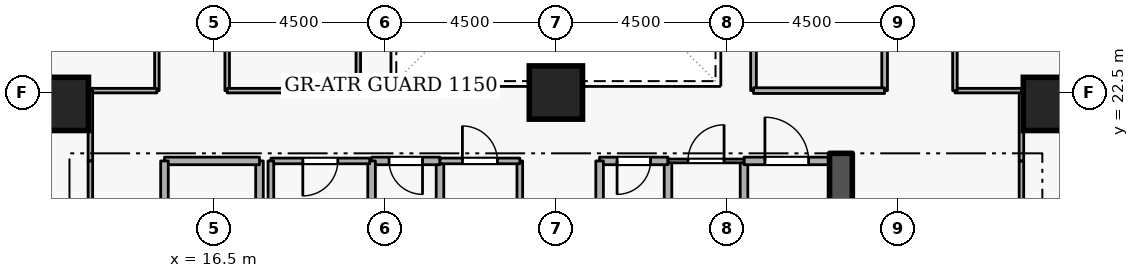
"""IFC4 building model, lengths in metres.
Left out: names, types, materials, properties, quantities, classifications, styles, units other than length and angle.
Written with IfcOpenShell. Run it as: python <this file> out.ifc"""

import sys

from ifc_helpers import new_model, si_unit, direction, frame, frame_2d, origin, origin_2d, place, context, subcontext, project, spatial, rectangle, extrude, element, fill, save


model = new_model("IFC4")
c1 = context("Model", 3, precision=1e-05, world=origin(), true_north=direction((0.0, 1.0)))
c2 = subcontext(c1, "Body", "Model", "MODEL_VIEW")
j1 = project(units=[si_unit("LENGTHUNIT", "METRE"), si_unit("PLANEANGLEUNIT", "RADIAN")], contexts=[c1])
p1 = place(None, origin())
s1 = spatial("IfcSite", under=j1, at=p1, CompositionType="ELEMENT")
p2 = place(p1, origin())
s2 = spatial("IfcBuilding", under=s1, at=p2, CompositionType="ELEMENT")
p3 = place(p2, frame((0.0, 0.0, 60.9)))
s3 = spatial("IfcBuildingStorey", under=s2, at=p3, CompositionType="ELEMENT", Elevation=60.9)
p4 = place(p3, frame((33.0, 15.2, 0.0), z_axis=(0.0, 0.0, 1.0), x_axis=(0.0, 1.0, 0.0)))
e1 = element("IfcWall", 1, at=p4, inside=s3, PredefinedType="SHEAR", context=c2, shape_type="SweptSolid", body=[
    extrude(rectangle(XDim=5.7, YDim=0.6, at=frame_2d((2.85, 0.0))), origin(), (0.0, 0.0, 1.0), 3.6),
])
for number, where, z_axis, x_axis in (
    (2, (12.5, 22.2, 0.0), (0.0, 0.0, 1.0), (1.0, 0.0, 0.0)),
    (3, (38.5, 22.2, 0.0), (0.0, 0.0, 1.0), (1.0, 0.0, 0.0)),
    (4, (25.5, 22.5, 0.0), (0.0, 0.0, 1.0), (1.0, 0.0, 0.0)),
):
    element("IfcColumn", number, at=place(p3, frame(where, z_axis=z_axis, x_axis=x_axis)), inside=s3, PredefinedType="COLUMN", context=c2, shape_type="SweptSolid", body=[
        extrude(rectangle(XDim=1.4, YDim=1.4, at=origin_2d()), origin(), (0.0, 0.0, 1.0), 3.6),
    ])
p5 = place(p3, frame((17.7, 18.4, 0.0), z_axis=(0.0, 0.0, 1.0), x_axis=(0.0, 1.0, 0.0)))
e5 = element("IfcWall", 5, at=p5, inside=s3, PredefinedType="STANDARD", context=c2, shape_type="SweptSolid", body=[
    extrude(rectangle(XDim=2.3, YDim=0.2, at=frame_2d((1.15, 0.0))), origin(), (0.0, 0.0, 1.0), 2.545),
])
p6 = place(p3, frame((17.7, 20.7, 0.0), z_axis=(0.0, 0.0, 1.0), x_axis=(-1.0, 0.0, 0.0)))
e6 = element("IfcWall", 6, at=p6, inside=s3, PredefinedType="STANDARD", context=c2, shape_type="SweptSolid", body=[
    extrude(rectangle(XDim=2.5, YDim=0.2, at=frame_2d((1.25, 0.0))), origin(), (0.0, 0.0, 1.0), 3.34),
])
p7 = place(p3, frame((15.2, 20.7, 0.0), z_axis=(0.0, 0.0, 1.0), x_axis=(0.0, -1.0, 0.0)))
e7 = element("IfcWall", 7, at=p7, inside=s3, PredefinedType="STANDARD", context=c2, shape_type="SweptSolid", body=[
    extrude(rectangle(XDim=5.7, YDim=0.2, at=frame_2d((2.85, 0.0))), origin(), (0.0, 0.0, 1.0), 3.34),
])
p8 = place(p7, frame((2.275, 0.0, 0.0)))
e8 = element("IfcOpeningElement", 8, at=p8, cuts=e7, PredefinedType="OPENING", context=c2, shape_type="SweptSolid", body=[
    extrude(rectangle(XDim=1.15, YDim=2.1, at=frame_2d((0.575, 1.05))), frame((0.0, 0.11, 0.0), z_axis=(0.0, -1.0, 0.0), x_axis=(1.0, 0.0, 0.0)), (0.0, 0.0, 1.0), 0.22),
])
p9 = place(p3, frame((28.45, 18.65, 0.0), z_axis=(0.0, 0.0, 1.0), x_axis=(0.0, 1.0, 0.0)))
e9 = element("IfcWall", 9, at=p9, inside=s3, PredefinedType="STANDARD", context=c2, shape_type="SweptSolid", body=[
    extrude(rectangle(XDim=2.05, YDim=0.2, at=frame_2d((1.025, 0.0))), origin(), (0.0, 0.0, 1.0), 3.34),
])
p10 = place(p3, frame((28.45, 20.7, 0.0), z_axis=(0.0, 0.0, 1.0), x_axis=(-1.0, 0.0, 0.0)))
e10 = element("IfcWall", 10, at=p10, inside=s3, PredefinedType="STANDARD", context=c2, shape_type="SweptSolid", body=[
    extrude(rectangle(XDim=1.8, YDim=0.2, at=frame_2d((0.9, 0.0))), origin(), (0.0, 0.0, 1.0), 3.34),
])
p11 = place(p10, frame((0.46, 0.0, 0.0)))
e11 = element("IfcOpeningElement", 11, at=p11, cuts=e10, PredefinedType="OPENING", context=c2, shape_type="SweptSolid", body=[
    extrude(rectangle(XDim=0.88, YDim=2.04, at=frame_2d((0.44, 1.02))), frame((0.0, 0.11, 0.0), z_axis=(0.0, -1.0, 0.0), x_axis=(1.0, 0.0, 0.0)), (0.0, 0.0, 1.0), 0.22),
])
for number, where, z_axis, x_axis in (
    (12, (26.65, 20.7, 0.0), (0.0, 0.0, 1.0), (0.0, -1.0, 0.0)),
    (13, (22.45, 18.65, 0.0), (0.0, 0.0, 1.0), (0.0, 1.0, 0.0)),
):
    element("IfcWall", number, at=place(p3, frame(where, z_axis=z_axis, x_axis=x_axis)), inside=s3, PredefinedType="STANDARD", context=c2, shape_type="SweptSolid", body=[
        extrude(rectangle(XDim=2.05, YDim=0.2, at=frame_2d((1.025, 0.0))), origin(), (0.0, 0.0, 1.0), 3.34),
    ])
p12 = place(p3, frame((22.45, 20.7, 0.0), z_axis=(0.0, 0.0, 1.0), x_axis=(-1.0, 0.0, 0.0)))
e14 = element("IfcWall", 14, at=p12, inside=s3, PredefinedType="STANDARD", context=c2, shape_type="SweptSolid", body=[
    extrude(rectangle(XDim=1.8, YDim=0.2, at=frame_2d((0.9, 0.0))), origin(), (0.0, 0.0, 1.0), 3.34),
])
p13 = place(p12, frame((0.46, 0.0, 0.0)))
e15 = element("IfcOpeningElement", 15, at=p13, cuts=e14, PredefinedType="OPENING", context=c2, shape_type="SweptSolid", body=[
    extrude(rectangle(XDim=0.88, YDim=2.04, at=frame_2d((0.44, 1.02))), frame((0.0, 0.11, 0.0), z_axis=(0.0, -1.0, 0.0), x_axis=(1.0, 0.0, 0.0)), (0.0, 0.0, 1.0), 0.22),
])
for number, where, z_axis, x_axis in (
    (16, (20.65, 20.7, 0.0), (0.0, 0.0, 1.0), (0.0, -1.0, 0.0)),
    (17, (30.45, 18.65, 0.0), (0.0, 0.0, 1.0), (0.0, 1.0, 0.0)),
):
    element("IfcWall", number, at=place(p3, frame(where, z_axis=z_axis, x_axis=x_axis)), inside=s3, PredefinedType="STANDARD", context=c2, shape_type="SweptSolid", body=[
        extrude(rectangle(XDim=2.05, YDim=0.2, at=frame_2d((1.025, 0.0))), origin(), (0.0, 0.0, 1.0), 3.34),
    ])
p14 = place(p3, frame((30.45, 20.7, 0.0), z_axis=(0.0, 0.0, 1.0), x_axis=(1.0, 0.0, 0.0)))
e18 = element("IfcWall", 18, at=p14, inside=s3, PredefinedType="STANDARD", context=c2, shape_type="SweptSolid", body=[
    extrude(rectangle(XDim=2.25, YDim=0.2, at=frame_2d((1.125, 0.0))), origin(), (0.0, 0.0, 1.0), 3.34),
])
p15 = place(p14, frame((0.55, 0.0, 0.0)))
e19 = element("IfcOpeningElement", 19, at=p15, cuts=e18, PredefinedType="OPENING", context=c2, shape_type="SweptSolid", body=[
    extrude(rectangle(XDim=1.15, YDim=2.1, at=frame_2d((0.575, 1.05))), frame((0.0, 0.11, 0.0), z_axis=(0.0, -1.0, 0.0), x_axis=(1.0, 0.0, 0.0)), (0.0, 0.0, 1.0), 0.22),
])
p16 = place(p3, frame((20.6, 20.7, 0.0), z_axis=(0.0, 0.0, 1.0), x_axis=(-1.0, 0.0, 0.0)))
e20 = element("IfcWall", 20, at=p16, inside=s3, PredefinedType="PARTITIONING", context=c2, shape_type="SweptSolid", body=[
    extrude(rectangle(XDim=2.6, YDim=0.15, at=frame_2d((1.3, 0.0))), origin(), (0.0, 0.0, 1.0), 3.34),
])
p17 = place(p16, frame((0.84, 0.0, 0.0)))
e21 = element("IfcOpeningElement", 21, at=p17, cuts=e20, PredefinedType="OPENING", context=c2, shape_type="SweptSolid", body=[
    extrude(rectangle(XDim=0.92, YDim=2.08, at=frame_2d((0.46, 1.04))), frame((0.0, 0.085, 0.0), z_axis=(0.0, -1.0, 0.0), x_axis=(1.0, 0.0, 0.0)), (0.0, 0.0, 1.0), 0.17),
])
p18 = place(p3, frame((18.0, 20.7, 0.0), z_axis=(0.0, 0.0, 1.0), x_axis=(0.0, -1.0, 0.0)))
e22 = element("IfcWall", 22, at=p18, inside=s3, PredefinedType="PARTITIONING", context=c2, shape_type="SweptSolid", body=[
    extrude(rectangle(XDim=2.05, YDim=0.15, at=frame_2d((1.025, 0.0))), origin(), (0.0, 0.0, 1.0), 2.545),
])
p19 = place(p3, frame((24.55, 20.7, 0.0), z_axis=(0.0, 0.0, 1.0), x_axis=(0.0, -1.0, 0.0)))
e23 = element("IfcWall", 23, at=p19, inside=s3, PredefinedType="PARTITIONING", context=c2, shape_type="SweptSolid", body=[
    extrude(rectangle(XDim=2.05, YDim=0.15, at=frame_2d((1.025, 0.0))), origin(), (0.0, 0.0, 1.0), 3.34),
])
p20 = place(p3, frame((22.45, 20.7, 0.0), z_axis=(0.0, 0.0, 1.0), x_axis=(1.0, 0.0, 0.0)))
e24 = element("IfcWall", 24, at=p20, inside=s3, PredefinedType="PARTITIONING", context=c2, shape_type="SweptSolid", body=[
    extrude(rectangle(XDim=2.1, YDim=0.15, at=frame_2d((1.05, 0.0))), origin(), (0.0, 0.0, 1.0), 3.34),
])
p21 = place(p20, frame((0.59, 0.0, 0.0)))
e25 = element("IfcOpeningElement", 25, at=p21, cuts=e24, PredefinedType="OPENING", context=c2, shape_type="SweptSolid", body=[
    extrude(rectangle(XDim=0.92, YDim=2.08, at=frame_2d((0.46, 1.04))), frame((0.0, 0.085, 0.0), z_axis=(0.0, -1.0, 0.0), x_axis=(1.0, 0.0, 0.0)), (0.0, 0.0, 1.0), 0.17),
])
p22 = place(p3, frame((28.45, 20.7, 0.0), z_axis=(0.0, 0.0, 1.0), x_axis=(1.0, 0.0, 0.0)))
e26 = element("IfcWall", 26, at=p22, inside=s3, PredefinedType="PARTITIONING", context=c2, shape_type="SweptSolid", body=[
    extrude(rectangle(XDim=2.0, YDim=0.1, at=frame_2d((1.0, 0.0))), origin(), (0.0, 0.0, 1.0), 3.34),
])
p23 = place(p22, frame((0.525, 0.0, 0.0)))
e27 = element("IfcOpeningElement", 27, at=p23, cuts=e26, PredefinedType="OPENING", context=c2, shape_type="SweptSolid", body=[
    extrude(rectangle(XDim=0.95, YDim=2.1, at=frame_2d((0.475, 1.05))), frame((0.0, 0.06, 0.0), z_axis=(0.0, -1.0, 0.0), x_axis=(1.0, 0.0, 0.0)), (0.0, 0.0, 1.0), 0.12),
])
p24 = place(p3, frame((15.0, 27.0, 0.0), z_axis=(0.0, 0.0, 1.0), x_axis=(0.0, -1.0, 0.0)))
e28 = element("IfcWall", 28, at=p24, inside=s3, PredefinedType="PARTITIONING", context=c2, shape_type="SweptSolid", body=[
    extrude(rectangle(XDim=4.45, YDim=0.12, at=frame_2d((2.225, 0.0))), origin(), (0.0, 0.0, 1.0), 3.34),
])
p25 = place(p3, frame((15.0, 22.55, 0.0), z_axis=(0.0, 0.0, 1.0), x_axis=(-1.0, 0.0, 0.0)))
e29 = element("IfcWall", 29, at=p25, inside=s3, PredefinedType="PARTITIONING", context=c2, shape_type="SweptSolid", body=[
    extrude(rectangle(XDim=1.75, YDim=0.12, at=frame_2d((0.875, 0.0))), origin(), (0.0, 0.0, 1.0), 3.34),
])
p26 = place(p3, frame((13.25, 22.55, 0.0), z_axis=(0.0, 0.0, 1.0), x_axis=(0.0, -1.0, 0.0)))
e30 = element("IfcWall", 30, at=p26, inside=s3, PredefinedType="PARTITIONING", context=c2, shape_type="SweptSolid", body=[
    extrude(rectangle(XDim=1.85, YDim=0.12, at=frame_2d((0.925, 0.0))), origin(), (0.0, 0.0, 1.0), 3.34),
])
p27 = place(p3, frame((13.25, 20.7, 0.0), z_axis=(0.0, 0.0, 1.0), x_axis=(0.0, -1.0, 0.0)))
e31 = element("IfcWall", 31, at=p27, inside=s3, PredefinedType="PARTITIONING", context=c2, shape_type="SweptSolid", body=[
    extrude(rectangle(XDim=9.35, YDim=0.12, at=frame_2d((4.675, 0.0))), origin(), (0.0, 0.0, 1.0), 3.34),
])
p28 = place(p27, frame((4.15, 0.0, 0.0)))
e32 = element("IfcOpeningElement", 32, at=p28, cuts=e31, PredefinedType="OPENING", context=c2, shape_type="SweptSolid", body=[
    extrude(rectangle(XDim=1.05, YDim=2.1, at=frame_2d((0.525, 1.05))), frame((0.0, 0.07, 0.0), z_axis=(0.0, -1.0, 0.0), x_axis=(1.0, 0.0, 0.0)), (0.0, 0.0, 1.0), 0.14),
])
p29 = place(p3, frame((37.75, 17.55, 0.0), z_axis=(0.0, 0.0, 1.0), x_axis=(0.0, 1.0, 0.0)))
e33 = element("IfcWall", 33, at=p29, inside=s3, PredefinedType="PARTITIONING", context=c2, shape_type="SweptSolid", body=[
    extrude(rectangle(XDim=3.15, YDim=0.12, at=frame_2d((1.575, 0.0))), origin(), (0.0, 0.0, 1.0), 3.34),
])
p30 = place(p3, frame((37.75, 20.7, 0.0), z_axis=(0.0, 0.0, 1.0), x_axis=(0.0, 1.0, 0.0)))
e34 = element("IfcWall", 34, at=p30, inside=s3, PredefinedType="PARTITIONING", context=c2, shape_type="SweptSolid", body=[
    extrude(rectangle(XDim=1.85, YDim=0.12, at=frame_2d((0.925, 0.0))), origin(), (0.0, 0.0, 1.0), 3.34),
])
p31 = place(p3, frame((37.75, 22.55, 0.0), z_axis=(0.0, 0.0, 1.0), x_axis=(-1.0, 0.0, 0.0)))
e35 = element("IfcWall", 35, at=p31, inside=s3, PredefinedType="PARTITIONING", context=c2, shape_type="SweptSolid", body=[
    extrude(rectangle(XDim=1.75, YDim=0.12, at=frame_2d((0.875, 0.0))), origin(), (0.0, 0.0, 1.0), 3.34),
])
p32 = place(p3, frame((36.0, 22.55, 0.0), z_axis=(0.0, 0.0, 1.0), x_axis=(0.0, 1.0, 0.0)))
e36 = element("IfcWall", 36, at=p32, inside=s3, PredefinedType="PARTITIONING", context=c2, shape_type="SweptSolid", body=[
    extrude(rectangle(XDim=4.45, YDim=0.12, at=frame_2d((2.225, 0.0))), origin(), (0.0, 0.0, 1.0), 3.34),
])
p33 = place(p32, frame((1.7, 0.0, 0.0)))
e37 = element("IfcOpeningElement", 37, at=p33, cuts=e36, PredefinedType="OPENING", context=c2, shape_type="SweptSolid", body=[
    extrude(rectangle(XDim=1.05, YDim=2.1, at=frame_2d((0.525, 1.05))), frame((0.0, 0.07, 0.0), z_axis=(0.0, -1.0, 0.0), x_axis=(1.0, 0.0, 0.0)), (0.0, 0.0, 1.0), 0.14),
])
p34 = place(p3, frame((30.7, 22.55, 0.0), z_axis=(0.0, 0.0, 1.0), x_axis=(0.0, 1.0, 0.0)))
e38 = element("IfcWall", 38, at=p34, inside=s3, PredefinedType="PARTITIONING", context=c2, shape_type="SweptSolid", body=[
    extrude(rectangle(XDim=8.9, YDim=0.15, at=frame_2d((4.45, 0.0))), origin(), (0.0, 0.0, 1.0), 3.34),
])
p35 = place(p3, frame((34.15, 31.45, 0.0), z_axis=(0.0, 0.0, 1.0), x_axis=(0.0, -1.0, 0.0)))
e39 = element("IfcWall", 39, at=p35, inside=s3, PredefinedType="PARTITIONING", context=c2, shape_type="SweptSolid", body=[
    extrude(rectangle(XDim=8.9, YDim=0.15, at=frame_2d((4.45, 0.0))), origin(), (0.0, 0.0, 1.0), 3.34),
])
p36 = place(p35, frame((3.8, 0.0, 0.0)))
e40 = element("IfcOpeningElement", 40, at=p36, cuts=e39, PredefinedType="OPENING", context=c2, shape_type="SweptSolid", body=[
    extrude(rectangle(XDim=1.3, YDim=2.12, at=frame_2d((0.65, 1.06))), frame((0.0, 0.085, 0.0), z_axis=(0.0, -1.0, 0.0), x_axis=(1.0, 0.0, 0.0)), (0.0, 0.0, 1.0), 0.17),
])
p37 = place(p3, frame((34.15, 22.55, 0.0), z_axis=(0.0, 0.0, 1.0), x_axis=(-1.0, 0.0, 0.0)))
e41 = element("IfcWall", 41, at=p37, inside=s3, PredefinedType="PARTITIONING", context=c2, shape_type="SweptSolid", body=[
    extrude(rectangle(XDim=3.45, YDim=0.15, at=frame_2d((1.725, 0.0))), origin(), (0.0, 0.0, 1.0), 3.34),
])
p38 = place(p3, frame((16.85, 22.55, 0.0), z_axis=(0.0, 0.0, 1.0), x_axis=(0.0, 1.0, 0.0)))
e42 = element("IfcWall", 42, at=p38, inside=s3, PredefinedType="PARTITIONING", context=c2, shape_type="SweptSolid", body=[
    extrude(rectangle(XDim=8.9, YDim=0.12, at=frame_2d((4.45, 0.0))), origin(), (0.0, 0.0, 1.0), 3.34),
])
p39 = place(p38, frame((3.975, 0.0, 0.0)))
e43 = element("IfcOpeningElement", 43, at=p39, cuts=e42, PredefinedType="OPENING", context=c2, shape_type="SweptSolid", body=[
    extrude(rectangle(XDim=0.95, YDim=2.1, at=frame_2d((0.475, 1.05))), frame((0.0, 0.07, 0.0), z_axis=(0.0, -1.0, 0.0), x_axis=(1.0, 0.0, 0.0)), (0.0, 0.0, 1.0), 0.14),
])
p40 = place(p3, frame((20.3, 31.45, 0.0), z_axis=(0.0, 0.0, 1.0), x_axis=(0.0, -1.0, 0.0)))
e44 = element("IfcWall", 44, at=p40, inside=s3, PredefinedType="PARTITIONING", context=c2, shape_type="SweptSolid", body=[
    extrude(rectangle(XDim=8.9, YDim=0.12, at=frame_2d((4.45, 0.0))), origin(), (0.0, 0.0, 1.0), 3.34),
])
p41 = place(p3, frame((20.3, 22.55, 0.0), z_axis=(0.0, 0.0, 1.0), x_axis=(-1.0, 0.0, 0.0)))
e45 = element("IfcWall", 45, at=p41, inside=s3, PredefinedType="PARTITIONING", context=c2, shape_type="SweptSolid", body=[
    extrude(rectangle(XDim=3.45, YDim=0.12, at=frame_2d((1.725, 0.0))), origin(), (0.0, 0.0, 1.0), 3.34),
])
p42 = place(p11, origin())
e46 = element("IfcDoor", 46, at=p42, inside=s3, OperationType="SINGLE_SWING_RIGHT", PredefinedType="DOOR", context=c2, shape_type="SweptSolid", body=[
    extrude(rectangle(XDim=0.88, YDim=2.04, at=frame_2d((0.44, 1.02))), frame((0.0, 0.025, 0.0), z_axis=(0.0, -1.0, 0.0), x_axis=(1.0, 0.0, 0.0)), (0.0, 0.0, 1.0), 0.05),
])
fill(e11, e46)
p43 = place(p13, origin())
e47 = element("IfcDoor", 47, at=p43, inside=s3, OperationType="SINGLE_SWING_LEFT", PredefinedType="DOOR", context=c2, shape_type="SweptSolid", body=[
    extrude(rectangle(XDim=0.88, YDim=2.04, at=frame_2d((0.44, 1.02))), frame((0.0, 0.025, 0.0), z_axis=(0.0, -1.0, 0.0), x_axis=(1.0, 0.0, 0.0)), (0.0, 0.0, 1.0), 0.05),
])
fill(e15, e47)
p44 = place(p17, origin())
e48 = element("IfcDoor", 48, at=p44, inside=s3, OperationType="SINGLE_SWING_RIGHT", PredefinedType="DOOR", context=c2, shape_type="SweptSolid", body=[
    extrude(rectangle(XDim=0.92, YDim=2.08, at=frame_2d((0.46, 1.04))), frame((0.0, 0.025, 0.0), z_axis=(0.0, -1.0, 0.0), x_axis=(1.0, 0.0, 0.0)), (0.0, 0.0, 1.0), 0.05),
])
fill(e21, e48)
p45 = place(p21, origin())
e49 = element("IfcDoor", 49, at=p45, inside=s3, OperationType="SINGLE_SWING_LEFT", PredefinedType="DOOR", context=c2, shape_type="SweptSolid", body=[
    extrude(rectangle(XDim=0.92, YDim=2.08, at=frame_2d((0.46, 1.04))), frame((0.0, 0.025, 0.0), z_axis=(0.0, -1.0, 0.0), x_axis=(1.0, 0.0, 0.0)), (0.0, 0.0, 1.0), 0.05),
])
fill(e25, e49)
p46 = place(p23, origin())
e50 = element("IfcDoor", 50, at=p46, inside=s3, OperationType="SINGLE_SWING_RIGHT", PredefinedType="DOOR", context=c2, shape_type="SweptSolid", body=[
    extrude(rectangle(XDim=0.95, YDim=2.1, at=frame_2d((0.475, 1.05))), frame((0.0, 0.025, 0.0), z_axis=(0.0, -1.0, 0.0), x_axis=(1.0, 0.0, 0.0)), (0.0, 0.0, 1.0), 0.05),
])
fill(e27, e50)
p47 = place(p15, origin())
e51 = element("IfcDoor", 51, at=p47, inside=s3, OperationType="SINGLE_SWING_LEFT", PredefinedType="DOOR", context=c2, shape_type="SweptSolid", body=[
    extrude(rectangle(XDim=1.15, YDim=2.1, at=frame_2d((0.575, 1.05))), frame((0.0, 0.025, 0.0), z_axis=(0.0, -1.0, 0.0), x_axis=(1.0, 0.0, 0.0)), (0.0, 0.0, 1.0), 0.05),
])
fill(e19, e51)
save(model, sys.argv[1])
